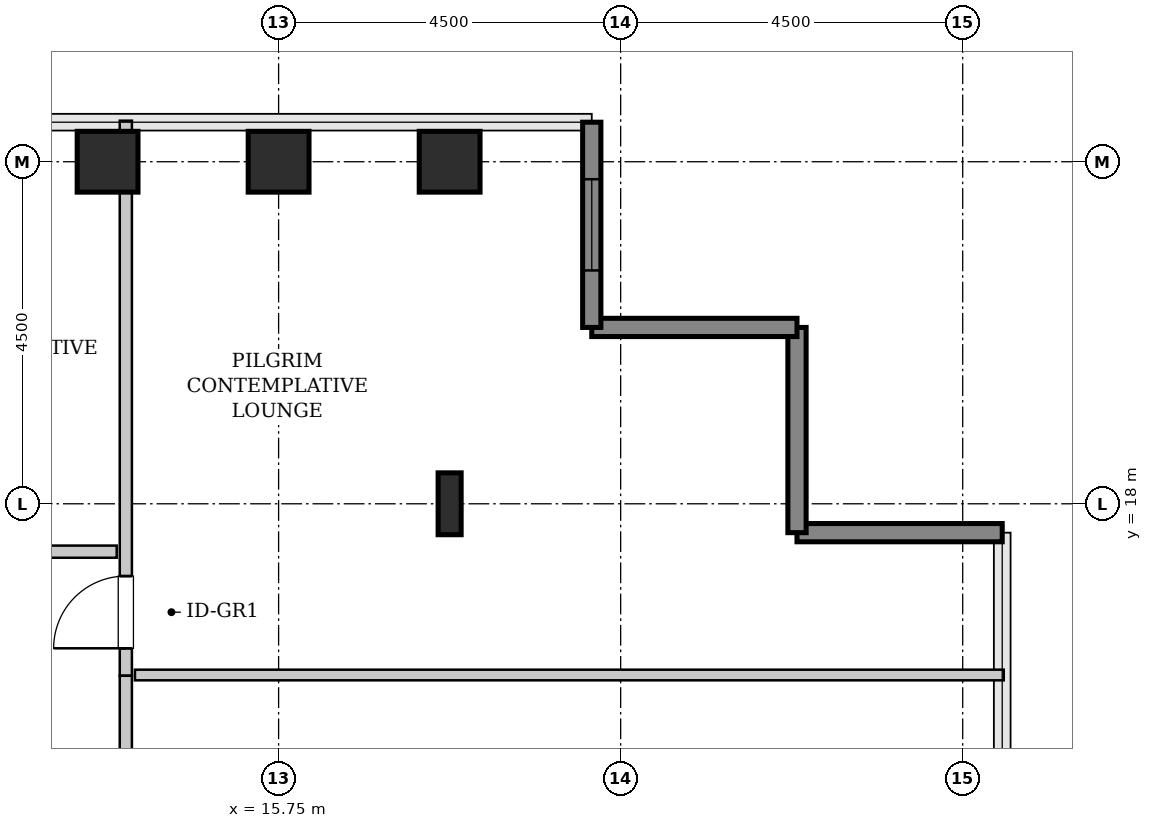
"""IFC4 building model, lengths in metres.
Left out: names, types, materials, properties, quantities, classifications, styles, units other than length and angle.
Written with IfcOpenShell. Run it as: python <this file> out.ifc"""

import sys

from ifc_helpers import new_model, si_unit, direction, frame, frame_2d, origin, origin_2d, place, context, subcontext, project, spatial, rectangle, hollow_rectangle, i_section, extrude, source, transform, mapped, element, fill, save


model = new_model("IFC4")
c1 = context("Model", 3, precision=1e-05, world=origin(), true_north=direction((0.0, 1.0)))
c2 = subcontext(c1, "Body", "Model", "MODEL_VIEW")
j1 = project(units=[si_unit("LENGTHUNIT", "METRE"), si_unit("PLANEANGLEUNIT", "RADIAN")], contexts=[c1])
p1 = place(None, origin())
s1 = spatial("IfcSite", under=j1, at=p1, CompositionType="ELEMENT")
p2 = place(p1, origin())
s2 = spatial("IfcBuilding", under=s1, at=p2, CompositionType="ELEMENT")
p3 = place(p2, frame((0.0, 0.0, 171.6)))
s3 = spatial("IfcBuildingStorey", under=s2, at=p3, CompositionType="ELEMENT", Elevation=171.6)
m1 = source(origin(), c2, "Body", "SweptSolid", [
    extrude(hollow_rectangle(XDim=0.8, YDim=0.8, WallThickness=0.04, InnerFilletRadius=0.04, OuterFilletRadius=0.08, at=origin_2d()), origin(), (0.0, 0.0, 1.0), 3.8),
])
for number, where, z_axis, x_axis in (
    (1, (13.5, 22.5, 0.0), (0.0, 0.0, 1.0), (1.0, 0.0, 0.0)),
    (2, (15.75, 22.5, 0.0), (0.0, 0.0, 1.0), (1.0, 0.0, 0.0)),
):
    element("IfcColumn", number, at=place(p3, frame(where, z_axis=z_axis, x_axis=x_axis)), inside=s3, PredefinedType="COLUMN", context=c2, shape_type="MappedRepresentation", body=[
        mapped(m1, transform((0.0, 0.0, 0.0), x_axis=(1.0, 0.0, 0.0), y_axis=(0.0, 1.0, 0.0), z_axis=(0.0, 0.0, 1.0), scale=1.0)),
    ])
m2 = source(origin(), c2, "Body", "SweptSolid", [
    extrude(i_section(OverallWidth=0.303, OverallDepth=0.814, WebThickness=0.021, FlangeThickness=0.04, FilletRadius=0.03, at=origin_2d()), origin(), (0.0, 0.0, 1.0), 3.8),
])
p4 = place(p3, frame((18.0, 18.0, 0.0), z_axis=(0.0, 0.0, 1.0), x_axis=(1.0, 0.0, 0.0)))
e3 = element("IfcColumn", 3, at=p4, inside=s3, PredefinedType="COLUMN", context=c2, shape_type="MappedRepresentation", body=[
    mapped(m2, transform((0.0, 0.0, 0.0), x_axis=(1.0, 0.0, 0.0), y_axis=(0.0, 1.0, 0.0), z_axis=(0.0, 0.0, 1.0), scale=1.0)),
])
p5 = place(p3, frame((18.0, 22.5, 0.0), z_axis=(0.0, 0.0, 1.0), x_axis=(1.0, 0.0, 0.0)))
e4 = element("IfcColumn", 4, at=p5, inside=s3, PredefinedType="COLUMN", context=c2, shape_type="MappedRepresentation", body=[
    mapped(m1, transform((0.0, 0.0, 0.0), x_axis=(1.0, 0.0, 0.0), y_axis=(0.0, 1.0, 0.0), z_axis=(0.0, 0.0, 1.0), scale=1.0)),
])
m3 = source(origin(), c2, "Body", "SweptSolid", [
    extrude(rectangle(XDim=2.7, YDim=0.24, at=frame_2d((1.35, 0.0))), origin(), (0.0, 0.0, 1.0), 3.55),
])
for number, where, z_axis, x_axis in (
    (5, (25.27, 17.62, 0.0), (0.0, 0.0, 1.0), (-1.0, 0.0, 0.0)),
    (6, (22.57, 17.62, 0.0), (0.0, 0.0, 1.0), (0.0, 1.0, 0.0)),
    (7, (22.57, 20.32, 0.0), (0.0, 0.0, 1.0), (-1.0, 0.0, 0.0)),
):
    element("IfcWall", number, at=place(p3, frame(where, z_axis=z_axis, x_axis=x_axis)), inside=s3, PredefinedType="SHEAR", context=c2, shape_type="MappedRepresentation", body=[
        mapped(m3, transform((0.0, 0.0, 0.0), x_axis=(1.0, 0.0, 0.0), y_axis=(0.0, 1.0, 0.0), z_axis=(0.0, 0.0, 1.0), scale=1.0)),
    ])
p6 = place(p3, frame((19.87, 20.32, 0.0), z_axis=(0.0, 0.0, 1.0), x_axis=(0.0, 1.0, 0.0)))
e8 = element("IfcWall", 8, at=p6, inside=s3, PredefinedType="SHEAR", context=c2, shape_type="MappedRepresentation", body=[
    mapped(m3, transform((0.0, 0.0, 0.0), x_axis=(1.0, 0.0, 0.0), y_axis=(0.0, 1.0, 0.0), z_axis=(0.0, 0.0, 1.0), scale=1.0)),
])
p7 = place(p6, frame((0.75, 0.0, 0.85)))
e9 = element("IfcOpeningElement", 9, at=p7, cuts=e8, PredefinedType="OPENING", context=c2, shape_type="SweptSolid", body=[
    extrude(rectangle(XDim=1.2, YDim=1.8, at=frame_2d((0.6, 0.9))), frame((0.0, 0.13, 0.0), z_axis=(0.0, -1.0, 0.0), x_axis=(1.0, 0.0, 0.0)), (0.0, 0.0, 1.0), 0.26),
])
m4 = source(origin(), c2, "Body", "SweptSolid", [
    extrude(rectangle(XDim=7.302, YDim=0.16, at=frame_2d((3.651, 0.0))), origin(), (0.0, 0.0, 1.0), 3.535),
])
p8 = place(p3, frame((13.74, 15.738, 0.0), z_axis=(0.0, 0.0, 1.0), x_axis=(0.0, 1.0, 0.0)))
e10 = element("IfcWall", 10, at=p8, inside=s3, PredefinedType="PARTITIONING", context=c2, shape_type="MappedRepresentation", body=[
    mapped(m4, transform((0.0, 0.0, 0.0), x_axis=(1.0, 0.0, 0.0), y_axis=(0.0, 1.0, 0.0), z_axis=(0.0, 0.0, 1.0), scale=1.0)),
])
p9 = place(p8, frame((0.361, 0.0, 0.0)))
e11 = element("IfcOpeningElement", 11, at=p9, cuts=e10, PredefinedType="OPENING", context=c2, shape_type="SweptSolid", body=[
    extrude(rectangle(XDim=0.95, YDim=2.1, at=frame_2d((0.475, 1.05))), frame((0.0, 0.09, 0.0), z_axis=(0.0, -1.0, 0.0), x_axis=(1.0, 0.0, 0.0)), (0.0, 0.0, 1.0), 0.18),
])
m5 = source(origin(), c2, "Body", "SweptSolid", [
    extrude(rectangle(XDim=11.43, YDim=0.14, at=frame_2d((5.715, 0.0))), origin(), (0.0, 0.0, 1.0), 3.535),
])
p10 = place(p3, frame((13.86, 15.748, 0.0), z_axis=(0.0, 0.0, 1.0), x_axis=(1.0, 0.0, 0.0)))
e12 = element("IfcWall", 12, at=p10, inside=s3, PredefinedType="PARTITIONING", context=c2, shape_type="MappedRepresentation", body=[
    mapped(m5, transform((0.0, 0.0, 0.0), x_axis=(1.0, 0.0, 0.0), y_axis=(0.0, 1.0, 0.0), z_axis=(0.0, 0.0, 1.0), scale=1.0)),
])
m6 = source(origin(), c2, "Body", "SweptSolid", [
    extrude(rectangle(XDim=7.242, YDim=0.16, at=frame_2d((3.621, 0.0))), origin(), (0.0, 0.0, 1.0), 3.535),
])
p11 = place(p3, frame((13.74, 8.495, 0.0), z_axis=(0.0, 0.0, 1.0), x_axis=(0.0, 1.0, 0.0)))
e13 = element("IfcWall", 13, at=p11, inside=s3, PredefinedType="PARTITIONING", context=c2, shape_type="MappedRepresentation", body=[
    mapped(m6, transform((0.0, 0.0, 0.0), x_axis=(1.0, 0.0, 0.0), y_axis=(0.0, 1.0, 0.0), z_axis=(0.0, 0.0, 1.0), scale=1.0)),
])
p12 = place(p11, frame((3.146, 0.0, 0.0)))
e14 = element("IfcOpeningElement", 14, at=p12, cuts=e13, PredefinedType="OPENING", context=c2, shape_type="SweptSolid", body=[
    extrude(rectangle(XDim=0.95, YDim=2.1, at=frame_2d((0.475, 1.05))), frame((0.0, 0.09, 0.0), z_axis=(0.0, -1.0, 0.0), x_axis=(1.0, 0.0, 0.0)), (0.0, 0.0, 1.0), 0.18),
])
m7 = source(origin(), c2, "Body", "SweptSolid", [
    extrude(rectangle(XDim=5.825, YDim=0.16, at=frame_2d((2.913, 0.0))), origin(), (0.0, 0.0, 1.0), 3.535),
])
p13 = place(p3, frame((7.795, 17.37, 0.0), z_axis=(0.0, 0.0, 1.0), x_axis=(1.0, 0.0, 0.0)))
e15 = element("IfcWall", 15, at=p13, inside=s3, PredefinedType="PARTITIONING", context=c2, shape_type="MappedRepresentation", body=[
    mapped(m7, transform((0.0, 0.0, 0.0), x_axis=(1.0, 0.0, 0.0), y_axis=(0.0, 1.0, 0.0), z_axis=(0.0, 0.0, 1.0), scale=1.0)),
])
p14 = place(p13, frame((2.092, 0.0, 0.0)))
e16 = element("IfcOpeningElement", 16, at=p14, cuts=e15, PredefinedType="OPENING", context=c2, shape_type="SweptSolid", body=[
    extrude(rectangle(XDim=0.95, YDim=2.1, at=frame_2d((0.475, 1.05))), frame((0.0, 0.09, 0.0), z_axis=(0.0, -1.0, 0.0), x_axis=(1.0, 0.0, 0.0)), (0.0, 0.0, 1.0), 0.18),
])
m8 = source(origin(), c2, "Body", "SweptSolid", [
    extrude(rectangle(XDim=1.2, YDim=1.8, at=frame_2d((0.6, 0.9))), frame((0.0, 0.03, 0.0), z_axis=(0.0, -1.0, 0.0), x_axis=(1.0, 0.0, 0.0)), (0.0, 0.0, 1.0), 0.06),
])
p15 = place(p7, origin())
e17 = element("IfcWindow", 17, at=p15, inside=s3, PartitioningType="SINGLE_PANEL", PredefinedType="WINDOW", context=c2, shape_type="MappedRepresentation", body=[
    mapped(m8, transform((0.0, 0.0, 0.0), x_axis=(1.0, 0.0, 0.0), y_axis=(0.0, 1.0, 0.0), z_axis=(0.0, 0.0, 1.0), scale=1.0)),
])
fill(e9, e17)
m9 = source(origin(), c2, "Body", "SweptSolid", [
    extrude(rectangle(XDim=0.95, YDim=2.1, at=frame_2d((0.475, 1.05))), frame((0.0, 0.025, 0.0), z_axis=(0.0, -1.0, 0.0), x_axis=(1.0, 0.0, 0.0)), (0.0, 0.0, 1.0), 0.05),
])
p16 = place(p9, origin())
e18 = element("IfcDoor", 18, at=p16, inside=s3, OperationType="SINGLE_SWING_LEFT", PredefinedType="DOOR", context=c2, shape_type="MappedRepresentation", body=[
    mapped(m9, transform((0.0, 0.0, 0.0), x_axis=(1.0, 0.0, 0.0), y_axis=(0.0, 1.0, 0.0), z_axis=(0.0, 0.0, 1.0), scale=1.0)),
])
fill(e11, e18)
save(model, sys.argv[1])
